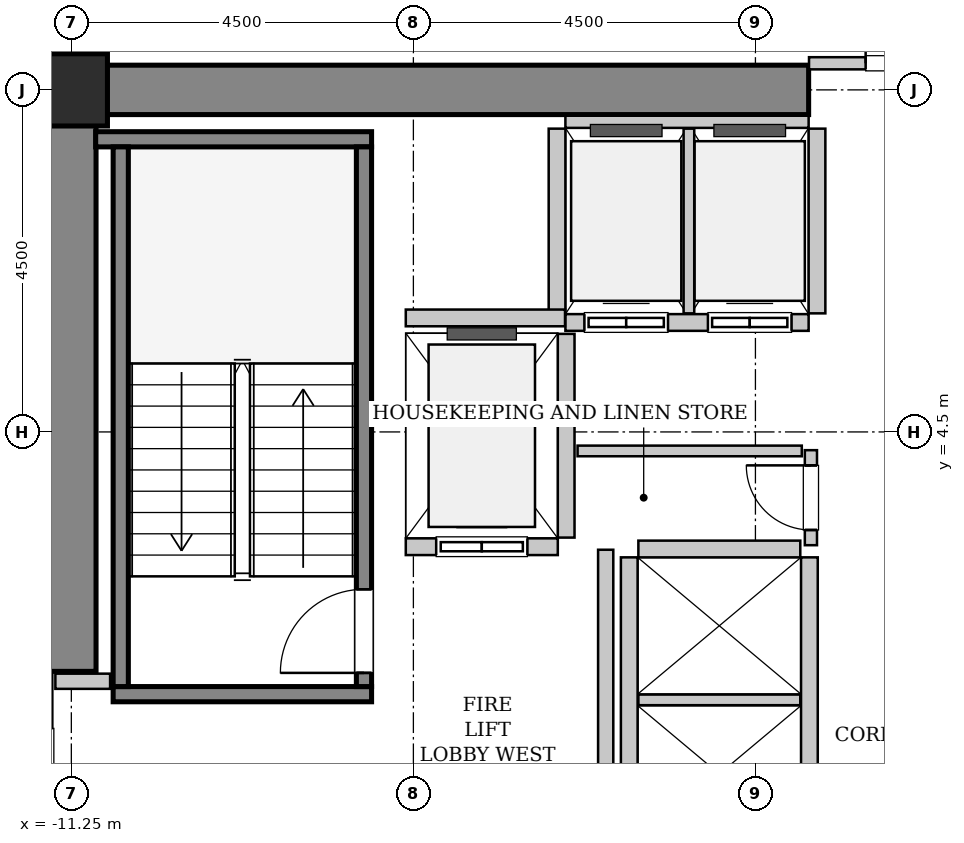
"""IFC4 building model, lengths in metres.
Left out: names, types, materials, properties, quantities, classifications, styles, units other than length and angle.
Written with IfcOpenShell. Run it as: python <this file> out.ifc"""

import sys

from ifc_helpers import new_model, si_unit, direction, frame, frame_2d, origin, origin_2d, place, context, subcontext, project, spatial, rectangle, hollow_rectangle, extrude, source, transform, mapped, element, fill, save


model = new_model("IFC4")
c1 = context("Model", 3, precision=1e-05, world=origin(), true_north=direction((0.0, 1.0)))
c2 = subcontext(c1, "Body", "Model", "MODEL_VIEW")
j1 = project(units=[si_unit("LENGTHUNIT", "METRE"), si_unit("PLANEANGLEUNIT", "RADIAN")], contexts=[c1])
p1 = place(None, origin())
s1 = spatial("IfcSite", under=j1, at=p1, CompositionType="ELEMENT")
p2 = place(p1, origin())
s2 = spatial("IfcBuilding", under=s1, at=p2, CompositionType="ELEMENT")
p3 = place(p2, frame((0.0, 0.0, 67.2)))
s3 = spatial("IfcBuildingStorey", under=s2, at=p3, CompositionType="ELEMENT", Elevation=67.2)
m1 = source(origin(), c2, "Body", "SweptSolid", [
    extrude(rectangle(XDim=10.025, YDim=0.65, at=frame_2d((5.012, 0.0))), origin(), (0.0, 0.0, 1.0), 3.8),
])
p4 = place(p3, frame((-11.575, 9.0, 0.0), z_axis=(0.0, 0.0, 1.0), x_axis=(1.0, 0.0, 0.0)))
e1 = element("IfcWall", 1, at=p4, inside=s3, PredefinedType="SHEAR", context=c2, shape_type="MappedRepresentation", body=[
    mapped(m1, transform((0.0, 0.0, 0.0), x_axis=(1.0, 0.0, 0.0), y_axis=(0.0, 1.0, 0.0), z_axis=(0.0, 0.0, 1.0), scale=1.0)),
])
m2 = source(origin(), c2, "Body", "SweptSolid", [
    extrude(rectangle(XDim=7.325, YDim=0.65, at=frame_2d((3.663, 0.0))), origin(), (0.0, 0.0, 1.0), 3.8),
])
p5 = place(p3, frame((-11.25, 1.35, 0.0), z_axis=(0.0, 0.0, 1.0), x_axis=(0.0, 1.0, 0.0)))
e2 = element("IfcWall", 2, at=p5, inside=s3, PredefinedType="SHEAR", context=c2, shape_type="MappedRepresentation", body=[
    mapped(m2, transform((0.0, 0.0, 0.0), x_axis=(1.0, 0.0, 0.0), y_axis=(0.0, 1.0, 0.0), z_axis=(0.0, 0.0, 1.0), scale=1.0)),
])
m3 = source(origin(), c2, "Body", "SweptSolid", [
    extrude(hollow_rectangle(XDim=0.95, YDim=0.95, WallThickness=0.045, InnerFilletRadius=0.045, OuterFilletRadius=0.09, at=origin_2d()), origin(), (0.0, 0.0, 1.0), 3.8),
])
p6 = place(p3, frame((-11.25, 9.0, 0.0), z_axis=(0.0, 0.0, 1.0), x_axis=(1.0, 0.0, 0.0)))
e3 = element("IfcColumn", 3, at=p6, inside=s3, PredefinedType="COLUMN", context=c2, shape_type="MappedRepresentation", body=[
    mapped(m3, transform((0.0, 0.0, 0.0), x_axis=(1.0, 0.0, 0.0), y_axis=(0.0, 1.0, 0.0), z_axis=(0.0, 0.0, 1.0), scale=1.0)),
])
m4 = source(origin(), c2, "Body", "SweptSolid", [
    extrude(rectangle(XDim=3.4, YDim=0.2, at=frame_2d((1.7, 0.0))), origin(), (0.0, 0.0, 1.0), 3.8),
])
p7 = place(p3, frame((-7.3, 1.05, 0.0), z_axis=(0.0, 0.0, 1.0), x_axis=(-1.0, 0.0, 0.0)))
e4 = element("IfcWall", 4, at=p7, inside=s3, PredefinedType="SOLIDWALL", context=c2, shape_type="MappedRepresentation", body=[
    mapped(m4, transform((0.0, 0.0, 0.0), x_axis=(1.0, 0.0, 0.0), y_axis=(0.0, 1.0, 0.0), z_axis=(0.0, 0.0, 1.0), scale=1.0)),
])
m5 = source(origin(), c2, "Body", "SweptSolid", [
    extrude(rectangle(XDim=3.63, YDim=0.2, at=frame_2d((1.815, 0.0))), origin(), (0.0, 0.0, 1.0), 3.8),
])
p8 = place(p3, frame((-7.3, 8.35, 0.0), z_axis=(0.0, 0.0, 1.0), x_axis=(-1.0, 0.0, 0.0)))
e5 = element("IfcWall", 5, at=p8, inside=s3, PredefinedType="SOLIDWALL", context=c2, shape_type="MappedRepresentation", body=[
    mapped(m5, transform((0.0, 0.0, 0.0), x_axis=(1.0, 0.0, 0.0), y_axis=(0.0, 1.0, 0.0), z_axis=(0.0, 0.0, 1.0), scale=1.0)),
])
m6 = source(origin(), c2, "Body", "SweptSolid", [
    extrude(rectangle(XDim=7.1, YDim=0.2, at=frame_2d((3.55, 0.0))), origin(), (0.0, 0.0, 1.0), 3.8),
])
p9 = place(p3, frame((-7.4, 1.15, 0.0), z_axis=(0.0, 0.0, 1.0), x_axis=(0.0, 1.0, 0.0)))
e6 = element("IfcWall", 6, at=p9, inside=s3, PredefinedType="SOLIDWALL", context=c2, shape_type="MappedRepresentation", body=[
    mapped(m6, transform((0.0, 0.0, 0.0), x_axis=(1.0, 0.0, 0.0), y_axis=(0.0, 1.0, 0.0), z_axis=(0.0, 0.0, 1.0), scale=1.0)),
])
p10 = place(p9, frame((0.18, 0.0, 0.0)))
e7 = element("IfcOpeningElement", 7, at=p10, cuts=e6, PredefinedType="OPENING", context=c2, shape_type="SweptSolid", body=[
    extrude(rectangle(XDim=1.1, YDim=2.15, at=frame_2d((0.55, 1.075))), frame((0.0, 0.11, 0.0), z_axis=(0.0, -1.0, 0.0), x_axis=(1.0, 0.0, 0.0)), (0.0, 0.0, 1.0), 0.22),
])
p11 = place(p3, frame((-10.6, 1.15, 0.0), z_axis=(0.0, 0.0, 1.0), x_axis=(0.0, 1.0, 0.0)))
e8 = element("IfcWall", 8, at=p11, inside=s3, PredefinedType="SOLIDWALL", context=c2, shape_type="MappedRepresentation", body=[
    mapped(m6, transform((0.0, 0.0, 0.0), x_axis=(1.0, 0.0, 0.0), y_axis=(0.0, 1.0, 0.0), z_axis=(0.0, 0.0, 1.0), scale=1.0)),
])
m7 = source(origin(), c2, "Body", "SweptSolid", [
    extrude(rectangle(XDim=2.0, YDim=0.22, at=frame_2d((1.0, 0.0))), origin(), (0.0, 0.0, 1.0), 3.535),
])
p12 = place(p3, frame((-6.85, 2.99, 0.0), z_axis=(0.0, 0.0, 1.0), x_axis=(1.0, 0.0, 0.0)))
e9 = element("IfcWall", 9, at=p12, inside=s3, PredefinedType="SOLIDWALL", context=c2, shape_type="MappedRepresentation", body=[
    mapped(m7, transform((0.0, 0.0, 0.0), x_axis=(1.0, 0.0, 0.0), y_axis=(0.0, 1.0, 0.0), z_axis=(0.0, 0.0, 1.0), scale=1.0)),
])
p13 = place(p12, frame((0.4, 0.0, 0.0)))
e10 = element("IfcOpeningElement", 10, at=p13, cuts=e9, PredefinedType="OPENING", context=c2, shape_type="SweptSolid", body=[
    extrude(rectangle(XDim=1.2, YDim=2.2, at=frame_2d((0.6, 1.1))), frame((0.0, 0.12, 0.0), z_axis=(0.0, -1.0, 0.0), x_axis=(1.0, 0.0, 0.0)), (0.0, 0.0, 1.0), 0.24),
])
m8 = source(origin(), c2, "Body", "SweptSolid", [
    extrude(rectangle(XDim=2.68, YDim=0.22, at=frame_2d((1.34, 0.0))), origin(), (0.0, 0.0, 1.0), 3.535),
])
p14 = place(p3, frame((-4.74, 3.11, 0.0), z_axis=(0.0, 0.0, 1.0), x_axis=(0.0, 1.0, 0.0)))
e11 = element("IfcWall", 11, at=p14, inside=s3, PredefinedType="SOLIDWALL", context=c2, shape_type="MappedRepresentation", body=[
    mapped(m8, transform((0.0, 0.0, 0.0), x_axis=(1.0, 0.0, 0.0), y_axis=(0.0, 1.0, 0.0), z_axis=(0.0, 0.0, 1.0), scale=1.0)),
])
m9 = source(origin(), c2, "Body", "SweptSolid", [
    extrude(rectangle(XDim=3.2, YDim=0.22, at=frame_2d((1.6, 0.0))), origin(), (0.0, 0.0, 1.0), 3.535),
])
p15 = place(p3, frame((-4.75, 5.94, 0.0), z_axis=(0.0, 0.0, 1.0), x_axis=(1.0, 0.0, 0.0)))
e12 = element("IfcWall", 12, at=p15, inside=s3, PredefinedType="SOLIDWALL", context=c2, shape_type="MappedRepresentation", body=[
    mapped(m9, transform((0.0, 0.0, 0.0), x_axis=(1.0, 0.0, 0.0), y_axis=(0.0, 1.0, 0.0), z_axis=(0.0, 0.0, 1.0), scale=1.0)),
])
p16 = place(p15, frame((0.25, 0.0, 0.0)))
e13 = element("IfcOpeningElement", 13, at=p16, cuts=e12, PredefinedType="OPENING", context=c2, shape_type="SweptSolid", body=[
    extrude(rectangle(XDim=1.1, YDim=2.2, at=frame_2d((0.55, 1.1))), frame((0.0, 0.12, 0.0), z_axis=(0.0, -1.0, 0.0), x_axis=(1.0, 0.0, 0.0)), (0.0, 0.0, 1.0), 0.24),
])
p17 = place(p15, frame((1.875, 0.0, 0.0)))
e14 = element("IfcOpeningElement", 14, at=p17, cuts=e12, PredefinedType="OPENING", context=c2, shape_type="SweptSolid", body=[
    extrude(rectangle(XDim=1.1, YDim=2.2, at=frame_2d((0.55, 1.1))), frame((0.0, 0.12, 0.0), z_axis=(0.0, -1.0, 0.0), x_axis=(1.0, 0.0, 0.0)), (0.0, 0.0, 1.0), 0.24),
])
m10 = source(origin(), c2, "Body", "SweptSolid", [
    extrude(rectangle(XDim=3.2, YDim=0.16, at=frame_2d((1.6, 0.0))), origin(), (0.0, 0.0, 1.0), 2.425),
])
p18 = place(p3, frame((-1.55, 8.58, 0.0), z_axis=(0.0, 0.0, 1.0), x_axis=(-1.0, 0.0, 0.0)))
e15 = element("IfcWall", 15, at=p18, inside=s3, PredefinedType="PARTITIONING", context=c2, shape_type="MappedRepresentation", body=[
    mapped(m10, transform((0.0, 0.0, 0.0), x_axis=(1.0, 0.0, 0.0), y_axis=(0.0, 1.0, 0.0), z_axis=(0.0, 0.0, 1.0), scale=1.0)),
])
m11 = source(origin(), c2, "Body", "SweptSolid", [
    extrude(rectangle(XDim=2.43, YDim=0.22, at=frame_2d((1.215, 0.0))), origin(), (0.0, 0.0, 1.0), 3.535),
])
p19 = place(p3, frame((-4.86, 8.49, 0.0), z_axis=(0.0, 0.0, 1.0), x_axis=(0.0, -1.0, 0.0)))
e16 = element("IfcWall", 16, at=p19, inside=s3, PredefinedType="SOLIDWALL", context=c2, shape_type="MappedRepresentation", body=[
    mapped(m11, transform((0.0, 0.0, 0.0), x_axis=(1.0, 0.0, 0.0), y_axis=(0.0, 1.0, 0.0), z_axis=(0.0, 0.0, 1.0), scale=1.0)),
])
m12 = source(origin(), c2, "Body", "SweptSolid", [
    extrude(rectangle(XDim=2.43, YDim=0.14, at=frame_2d((1.215, 0.0))), origin(), (0.0, 0.0, 1.0), 3.535),
])
p20 = place(p3, frame((-3.125, 6.06, 0.0), z_axis=(0.0, 0.0, 1.0), x_axis=(0.0, 1.0, 0.0)))
e17 = element("IfcWall", 17, at=p20, inside=s3, PredefinedType="PARTITIONING", context=c2, shape_type="MappedRepresentation", body=[
    mapped(m12, transform((0.0, 0.0, 0.0), x_axis=(1.0, 0.0, 0.0), y_axis=(0.0, 1.0, 0.0), z_axis=(0.0, 0.0, 1.0), scale=1.0)),
])
p21 = place(p3, frame((-1.44, 6.06, 0.0), z_axis=(0.0, 0.0, 1.0), x_axis=(0.0, 1.0, 0.0)))
e18 = element("IfcWall", 18, at=p21, inside=s3, PredefinedType="SOLIDWALL", context=c2, shape_type="MappedRepresentation", body=[
    mapped(m11, transform((0.0, 0.0, 0.0), x_axis=(1.0, 0.0, 0.0), y_axis=(0.0, 1.0, 0.0), z_axis=(0.0, 0.0, 1.0), scale=1.0)),
])
m13 = source(origin(), c2, "Body", "SweptSolid", [
    extrude(rectangle(XDim=5.7, YDim=0.22, at=frame_2d((2.85, 0.0))), origin(), (0.0, 0.0, 1.0), 3.535),
])
for number, where, z_axis, x_axis in (
    (19, (-1.54, -2.85, 0.0), (0.0, 0.0, 1.0), (0.0, 1.0, 0.0)),
    (20, (-3.91, 2.85, 0.0), (0.0, 0.0, 1.0), (0.0, -1.0, 0.0)),
):
    element("IfcWall", number, at=place(p3, frame(where, z_axis=z_axis, x_axis=x_axis)), inside=s3, PredefinedType="SOLIDWALL", context=c2, shape_type="MappedRepresentation", body=[
        mapped(m13, transform((0.0, 0.0, 0.0), x_axis=(1.0, 0.0, 0.0), y_axis=(0.0, 1.0, 0.0), z_axis=(0.0, 0.0, 1.0), scale=1.0)),
    ])
m14 = source(origin(), c2, "Body", "SweptSolid", [
    extrude(rectangle(XDim=2.13, YDim=0.14, at=frame_2d((1.065, 0.0))), origin(), (0.0, 0.0, 1.0), 3.535),
])
p22 = place(p3, frame((-3.79, 0.975, 0.0), z_axis=(0.0, 0.0, 1.0), x_axis=(1.0, 0.0, 0.0)))
e21 = element("IfcWall", 21, at=p22, inside=s3, PredefinedType="PARTITIONING", context=c2, shape_type="MappedRepresentation", body=[
    mapped(m14, transform((0.0, 0.0, 0.0), x_axis=(1.0, 0.0, 0.0), y_axis=(0.0, 1.0, 0.0), z_axis=(0.0, 0.0, 1.0), scale=1.0)),
])
m15 = source(origin(), c2, "Body", "SweptSolid", [
    extrude(rectangle(XDim=2.13, YDim=0.22, at=frame_2d((1.065, 0.0))), origin(), (0.0, 0.0, 1.0), 3.535),
])
p23 = place(p3, frame((-1.66, 2.96, 0.0), z_axis=(0.0, 0.0, 1.0), x_axis=(-1.0, 0.0, 0.0)))
e22 = element("IfcWall", 22, at=p23, inside=s3, PredefinedType="SOLIDWALL", context=c2, shape_type="MappedRepresentation", body=[
    mapped(m15, transform((0.0, 0.0, 0.0), x_axis=(1.0, 0.0, 0.0), y_axis=(0.0, 1.0, 0.0), z_axis=(0.0, 0.0, 1.0), scale=1.0)),
])
m16 = source(origin(), c2, "Body", "SweptSolid", [
    extrude(rectangle(XDim=2.095, YDim=0.22, at=frame_2d((1.048, 0.0))), origin(), (0.0, 0.0, 1.0), 3.535),
])
p24 = place(p3, frame((-6.85, 6.0, 0.0), z_axis=(0.0, 0.0, 1.0), x_axis=(1.0, 0.0, 0.0)))
e23 = element("IfcWall", 23, at=p24, inside=s3, PredefinedType="SOLIDWALL", context=c2, shape_type="MappedRepresentation", body=[
    mapped(m16, transform((0.0, 0.0, 0.0), x_axis=(1.0, 0.0, 0.0), y_axis=(0.0, 1.0, 0.0), z_axis=(0.0, 0.0, 1.0), scale=1.0)),
])
m17 = source(origin(), c2, "Body", "SweptSolid", [
    extrude(rectangle(XDim=5.9, YDim=0.2, at=frame_2d((2.95, 0.0))), origin(), (0.0, 0.0, 1.0), 3.535),
])
p25 = place(p3, frame((-4.22, -2.95, 0.0), z_axis=(0.0, 0.0, 1.0), x_axis=(0.0, 1.0, 0.0)))
e24 = element("IfcWall", 24, at=p25, inside=s3, PredefinedType="PARTITIONING", context=c2, shape_type="MappedRepresentation", body=[
    mapped(m17, transform((0.0, 0.0, 0.0), x_axis=(1.0, 0.0, 0.0), y_axis=(0.0, 1.0, 0.0), z_axis=(0.0, 0.0, 1.0), scale=1.0)),
])
m18 = source(origin(), c2, "Body", "SweptSolid", [
    extrude(rectangle(XDim=0.72, YDim=0.2, at=frame_2d((0.36, 0.0))), origin(), (0.0, 0.0, 1.0), 3.535),
])
p26 = place(p3, frame((-11.46, 1.22, 0.0), z_axis=(0.0, 0.0, 1.0), x_axis=(1.0, 0.0, 0.0)))
e25 = element("IfcWall", 25, at=p26, inside=s3, PredefinedType="PARTITIONING", context=c2, shape_type="MappedRepresentation", body=[
    mapped(m18, transform((0.0, 0.0, 0.0), x_axis=(1.0, 0.0, 0.0), y_axis=(0.0, 1.0, 0.0), z_axis=(0.0, 0.0, 1.0), scale=1.0)),
])
m19 = source(origin(), c2, "Body", "SweptSolid", [
    extrude(rectangle(XDim=3.09, YDim=0.16, at=frame_2d((1.545, 0.0))), origin(), (0.0, 0.0, 1.0), 2.425),
])
p27 = place(p3, frame((-1.545, 9.35, 0.0), z_axis=(0.0, 0.0, 1.0), x_axis=(1.0, 0.0, 0.0)))
e26 = element("IfcWall", 26, at=p27, inside=s3, PredefinedType="PARTITIONING", context=c2, shape_type="MappedRepresentation", body=[
    mapped(m19, transform((0.0, 0.0, 0.0), x_axis=(1.0, 0.0, 0.0), y_axis=(0.0, 1.0, 0.0), z_axis=(0.0, 0.0, 1.0), scale=1.0)),
])
p28 = place(p27, frame((0.745, 0.0, 0.0)))
e27 = element("IfcOpeningElement", 27, at=p28, cuts=e26, PredefinedType="OPENING", context=c2, shape_type="SweptSolid", body=[
    extrude(rectangle(XDim=1.6, YDim=2.3, at=frame_2d((0.8, 1.15))), frame((0.0, 0.09, 0.0), z_axis=(0.0, -1.0, 0.0), x_axis=(1.0, 0.0, 0.0)), (0.0, 0.0, 1.0), 0.18),
])
m20 = source(origin(), c2, "Body", "SweptSolid", [
    extrude(rectangle(XDim=1.25, YDim=0.16, at=frame_2d((0.625, 0.0))), origin(), (0.0, 0.0, 1.0), 3.535),
])
p29 = place(p3, frame((-1.52, 3.01, 0.0), z_axis=(0.0, 0.0, 1.0), x_axis=(0.0, 1.0, 0.0)))
e28 = element("IfcWall", 28, at=p29, inside=s3, PredefinedType="PARTITIONING", context=c2, shape_type="MappedRepresentation", body=[
    mapped(m20, transform((0.0, 0.0, 0.0), x_axis=(1.0, 0.0, 0.0), y_axis=(0.0, 1.0, 0.0), z_axis=(0.0, 0.0, 1.0), scale=1.0)),
])
p30 = place(p29, frame((0.2, 0.0, 0.0)))
e29 = element("IfcOpeningElement", 29, at=p30, cuts=e28, PredefinedType="OPENING", context=c2, shape_type="SweptSolid", body=[
    extrude(rectangle(XDim=0.85, YDim=2.1, at=frame_2d((0.425, 1.05))), frame((0.0, 0.09, 0.0), z_axis=(0.0, -1.0, 0.0), x_axis=(1.0, 0.0, 0.0)), (0.0, 0.0, 1.0), 0.18),
])
m21 = source(origin(), c2, "Body", "SweptSolid", [
    extrude(rectangle(XDim=2.95, YDim=0.14, at=frame_2d((1.475, 0.0))), origin(), (0.0, 0.0, 1.0), 3.535),
])
p31 = place(p3, frame((-4.59, 4.25, 0.0), z_axis=(0.0, 0.0, 1.0), x_axis=(1.0, 0.0, 0.0)))
e30 = element("IfcWall", 30, at=p31, inside=s3, PredefinedType="PARTITIONING", context=c2, shape_type="MappedRepresentation", body=[
    mapped(m21, transform((0.0, 0.0, 0.0), x_axis=(1.0, 0.0, 0.0), y_axis=(0.0, 1.0, 0.0), z_axis=(0.0, 0.0, 1.0), scale=1.0)),
])
m22 = source(origin(), c2, "Body", "SweptSolid", [
    extrude(rectangle(XDim=1.1, YDim=2.15, at=frame_2d((0.55, 1.075))), frame((0.0, 0.025, 0.0), z_axis=(0.0, -1.0, 0.0), x_axis=(1.0, 0.0, 0.0)), (0.0, 0.0, 1.0), 0.05),
])
p32 = place(p10, origin())
e31 = element("IfcDoor", 31, at=p32, inside=s3, OperationType="SINGLE_SWING_LEFT", PredefinedType="DOOR", context=c2, shape_type="MappedRepresentation", body=[
    mapped(m22, transform((0.0, 0.0, 0.0), x_axis=(1.0, 0.0, 0.0), y_axis=(0.0, 1.0, 0.0), z_axis=(0.0, 0.0, 1.0), scale=1.0)),
])
fill(e7, e31)
m23 = source(origin(), c2, "Body", "SweptSolid", [
    extrude(rectangle(XDim=1.2, YDim=2.2, at=frame_2d((0.6, 1.1))), frame((0.0, 0.025, 0.0), z_axis=(0.0, -1.0, 0.0), x_axis=(1.0, 0.0, 0.0)), (0.0, 0.0, 1.0), 0.05),
])
p33 = place(p13, origin())
e32 = element("IfcDoor", 32, at=p33, inside=s3, OperationType="SLIDING_TO_LEFT", PredefinedType="DOOR", context=c2, shape_type="MappedRepresentation", body=[
    mapped(m23, transform((0.0, 0.0, 0.0), x_axis=(1.0, 0.0, 0.0), y_axis=(0.0, 1.0, 0.0), z_axis=(0.0, 0.0, 1.0), scale=1.0)),
])
fill(e10, e32)
m24 = source(origin(), c2, "Body", "SweptSolid", [
    extrude(rectangle(XDim=1.1, YDim=2.2, at=frame_2d((0.55, 1.1))), frame((0.0, 0.025, 0.0), z_axis=(0.0, -1.0, 0.0), x_axis=(1.0, 0.0, 0.0)), (0.0, 0.0, 1.0), 0.05),
])
p34 = place(p16, origin())
e33 = element("IfcDoor", 33, at=p34, inside=s3, OperationType="DOUBLE_DOOR_SLIDING", PredefinedType="DOOR", context=c2, shape_type="MappedRepresentation", body=[
    mapped(m24, transform((0.0, 0.0, 0.0), x_axis=(1.0, 0.0, 0.0), y_axis=(0.0, 1.0, 0.0), z_axis=(0.0, 0.0, 1.0), scale=1.0)),
])
fill(e13, e33)
p35 = place(p17, origin())
e34 = element("IfcDoor", 34, at=p35, inside=s3, OperationType="DOUBLE_DOOR_SLIDING", PredefinedType="DOOR", context=c2, shape_type="MappedRepresentation", body=[
    mapped(m24, transform((0.0, 0.0, 0.0), x_axis=(1.0, 0.0, 0.0), y_axis=(0.0, 1.0, 0.0), z_axis=(0.0, 0.0, 1.0), scale=1.0)),
])
fill(e14, e34)
m25 = source(origin(), c2, "Body", "SweptSolid", [
    extrude(rectangle(XDim=1.6, YDim=2.3, at=frame_2d((0.8, 1.15))), frame((0.0, 0.025, 0.0), z_axis=(0.0, -1.0, 0.0), x_axis=(1.0, 0.0, 0.0)), (0.0, 0.0, 1.0), 0.05),
])
p36 = place(p28, origin())
e35 = element("IfcDoor", 35, at=p36, inside=s3, OperationType="DOUBLE_DOOR_SINGLE_SWING", PredefinedType="DOOR", context=c2, shape_type="MappedRepresentation", body=[
    mapped(m25, transform((0.0, 0.0, 0.0), x_axis=(1.0, 0.0, 0.0), y_axis=(0.0, 1.0, 0.0), z_axis=(0.0, 0.0, 1.0), scale=1.0)),
])
fill(e27, e35)
m26 = source(origin(), c2, "Body", "SweptSolid", [
    extrude(rectangle(XDim=0.85, YDim=2.1, at=frame_2d((0.425, 1.05))), frame((0.0, 0.025, 0.0), z_axis=(0.0, -1.0, 0.0), x_axis=(1.0, 0.0, 0.0)), (0.0, 0.0, 1.0), 0.05),
])
p37 = place(p30, origin())
e36 = element("IfcDoor", 36, at=p37, inside=s3, OperationType="SINGLE_SWING_RIGHT", PredefinedType="DOOR", context=c2, shape_type="MappedRepresentation", body=[
    mapped(m26, transform((0.0, 0.0, 0.0), x_axis=(1.0, 0.0, 0.0), y_axis=(0.0, 1.0, 0.0), z_axis=(0.0, 0.0, 1.0), scale=1.0)),
])
fill(e29, e36)
save(model, sys.argv[1])
